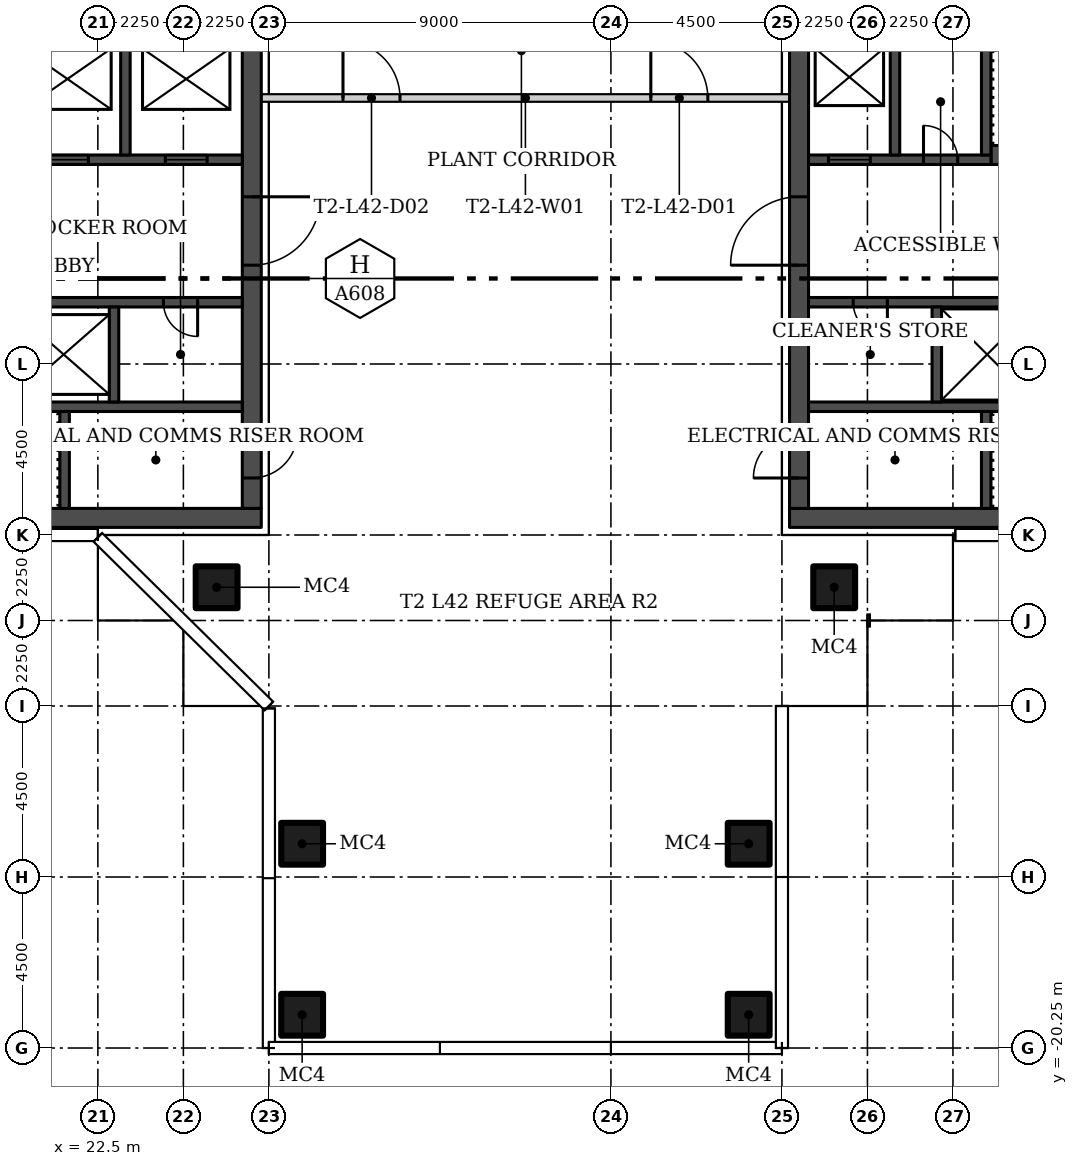
"""IFC4 building model, lengths in metres.
Left out: names, types, materials, properties, quantities, classifications, styles, units other than length and angle.
Written with IfcOpenShell. Run it as: python <this file> out.ifc"""

import sys

from ifc_helpers import new_model, si_unit, direction, frame, frame_2d, origin, origin_2d, place, context, subcontext, project, spatial, rectangle, hollow_rectangle, extrude, element, fill, save


model = new_model("IFC4")
c1 = context("Model", 3, precision=1e-05, world=origin(), true_north=direction((0.0, 1.0)))
c2 = subcontext(c1, "Body", "Model", "MODEL_VIEW")
j1 = project(units=[si_unit("LENGTHUNIT", "METRE"), si_unit("PLANEANGLEUNIT", "RADIAN")], contexts=[c1])
p1 = place(None, origin())
s1 = spatial("IfcSite", under=j1, at=p1, CompositionType="ELEMENT")
p2 = place(p1, origin())
s2 = spatial("IfcBuilding", under=s1, at=p2, CompositionType="ELEMENT")
p3 = place(p2, frame((0.0, 0.0, 177.9)))
s3 = spatial("IfcBuildingStorey", under=s2, at=p3, CompositionType="ELEMENT", Elevation=177.9)
for number, where in (
    (1, (25.625, -8.125, 0.0)),
    (2, (41.875, -8.125, 0.0)),
    (3, (39.625, -14.875, 0.0)),
    (4, (39.625, -19.375, 0.0)),
    (5, (27.875, -14.875, 0.0)),
    (6, (27.875, -19.375, 0.0)),
):
    element("IfcColumn", number, at=place(p3, frame(where)), inside=s3, PredefinedType="COLUMN", context=c2, shape_type="SweptSolid", body=[
        extrude(hollow_rectangle(XDim=1.1, YDim=1.1, WallThickness=0.04, at=origin_2d()), origin(), (0.0, 0.0, 1.0), 4.45),
    ])
p4 = place(p3, frame((26.8, 4.75, 0.0)))
e7 = element("IfcWall", 7, at=p4, inside=s3, PredefinedType="PARTITIONING", context=c2, shape_type="SweptSolid", body=[
    extrude(rectangle(XDim=13.9, YDim=0.2, at=frame_2d((6.95, 0.0))), origin(), (0.0, 0.0, 1.0), 4.45),
])
p5 = place(p4, frame((10.25, 0.0, 0.0)))
e8 = element("IfcOpeningElement", 8, at=p5, cuts=e7, PredefinedType="OPENING", context=c2, shape_type="SweptSolid", body=[
    extrude(rectangle(XDim=1.5, YDim=2.4, at=frame_2d((0.75, 1.2))), frame((0.0, 0.11, 0.0), z_axis=(0.0, -1.0, 0.0), x_axis=(1.0, 0.0, 0.0)), (0.0, 0.0, 1.0), 0.22),
])
p6 = place(p4, frame((2.15, 0.0, 0.0)))
e9 = element("IfcOpeningElement", 9, at=p6, cuts=e7, PredefinedType="OPENING", context=c2, shape_type="SweptSolid", body=[
    extrude(rectangle(XDim=1.5, YDim=2.4, at=frame_2d((0.75, 1.2))), frame((0.0, 0.11, 0.0), z_axis=(0.0, -1.0, 0.0), x_axis=(1.0, 0.0, 0.0)), (0.0, 0.0, 1.0), 0.22),
])
p7 = place(p3, frame((13.7, -6.3, 0.0)))
e10 = element("IfcWall", 10, at=p7, inside=s3, PredefinedType="SHEAR", context=c2, shape_type="SweptSolid", body=[
    extrude(rectangle(XDim=13.1, YDim=0.5, at=frame_2d((6.55, 0.0))), origin(), (0.0, 0.0, 1.0), 4.45),
])
p8 = place(p3, frame((26.55, 6.05, 0.0), z_axis=(0.0, 0.0, 1.0), x_axis=(0.0, -1.0, 0.0)))
e11 = element("IfcWall", 11, at=p8, inside=s3, PredefinedType="SHEAR", context=c2, shape_type="SweptSolid", body=[
    extrude(rectangle(XDim=12.1, YDim=0.5, at=frame_2d((6.05, 0.0))), origin(), (0.0, 0.0, 1.0), 4.45),
])
p9 = place(p8, frame((10.1, 0.0, 0.0)))
e12 = element("IfcOpeningElement", 12, at=p9, cuts=e11, PredefinedType="OPENING", context=c2, shape_type="SweptSolid", body=[
    extrude(rectangle(XDim=1.2, YDim=2.1, at=frame_2d((0.6, 1.05))), frame((0.0, 0.26, 0.0), z_axis=(0.0, -1.0, 0.0), x_axis=(1.0, 0.0, 0.0)), (0.0, 0.0, 1.0), 0.52),
])
p10 = place(p8, frame((3.9, 0.0, 0.0)))
e13 = element("IfcOpeningElement", 13, at=p10, cuts=e11, PredefinedType="OPENING", context=c2, shape_type="SweptSolid", body=[
    extrude(rectangle(XDim=1.8, YDim=2.4, at=frame_2d((0.9, 1.2))), frame((0.0, 0.26, 0.0), z_axis=(0.0, -1.0, 0.0), x_axis=(1.0, 0.0, 0.0)), (0.0, 0.0, 1.0), 0.52),
])
p11 = place(p3, frame((26.3, -3.375, 0.0), z_axis=(0.0, 0.0, 1.0), x_axis=(-1.0, 0.0, 0.0)))
e14 = element("IfcWall", 14, at=p11, inside=s3, PredefinedType="SHEAR", context=c2, shape_type="SweptSolid", body=[
    extrude(rectangle(XDim=12.1, YDim=0.25, at=frame_2d((6.05, 0.0))), origin(), (0.0, 0.0, 1.0), 4.45),
])
p12 = place(p11, frame((10.95, 0.0, 0.0)))
e15 = element("IfcOpeningElement", 15, at=p12, cuts=e14, PredefinedType="OPENING", context=c2, shape_type="SweptSolid", body=[
    extrude(rectangle(XDim=1.1, YDim=2.1, at=frame_2d((0.55, 1.05))), frame((0.0, 0.135, 0.0), z_axis=(0.0, -1.0, 0.0), x_axis=(1.0, 0.0, 0.0)), (0.0, 0.0, 1.0), 0.27),
])
p13 = place(p3, frame((21.625, -6.05, 0.0), z_axis=(0.0, 0.0, 1.0), x_axis=(0.0, 1.0, 0.0)))
e16 = element("IfcWall", 16, at=p13, inside=s3, PredefinedType="SHEAR", context=c2, shape_type="SweptSolid", body=[
    extrude(rectangle(XDim=2.55, YDim=0.25, at=frame_2d((1.275, 0.0))), origin(), (0.0, 0.0, 1.0), 4.45),
])
p14 = place(p3, frame((26.3, -0.625, 0.0), z_axis=(0.0, 0.0, 1.0), x_axis=(-1.0, 0.0, 0.0)))
e17 = element("IfcWall", 17, at=p14, inside=s3, PredefinedType="SHEAR", context=c2, shape_type="SweptSolid", body=[
    extrude(rectangle(XDim=12.1, YDim=0.25, at=frame_2d((6.05, 0.0))), origin(), (0.0, 0.0, 1.0), 4.45),
])
p15 = place(p14, frame((8.65, 0.0, 0.0)))
e18 = element("IfcOpeningElement", 18, at=p15, cuts=e17, PredefinedType="OPENING", context=c2, shape_type="SweptSolid", body=[
    extrude(rectangle(XDim=1.2, YDim=2.1, at=frame_2d((0.6, 1.05))), frame((0.0, 0.135, 0.0), z_axis=(0.0, -1.0, 0.0), x_axis=(1.0, 0.0, 0.0)), (0.0, 0.0, 1.0), 0.27),
])
p16 = place(p14, frame((1.175, 0.0, 0.0)))
e19 = element("IfcOpeningElement", 19, at=p16, cuts=e17, PredefinedType="OPENING", context=c2, shape_type="SweptSolid", body=[
    extrude(rectangle(XDim=0.9, YDim=2.1, at=frame_2d((0.45, 1.05))), frame((0.0, 0.135, 0.0), z_axis=(0.0, -1.0, 0.0), x_axis=(1.0, 0.0, 0.0)), (0.0, 0.0, 1.0), 0.27),
])
p17 = place(p3, frame((22.925, -3.25, 0.0), z_axis=(0.0, 0.0, 1.0), x_axis=(0.0, 1.0, 0.0)))
e20 = element("IfcWall", 20, at=p17, inside=s3, PredefinedType="SHEAR", context=c2, shape_type="SweptSolid", body=[
    extrude(rectangle(XDim=2.5, YDim=0.25, at=frame_2d((1.25, 0.0))), origin(), (0.0, 0.0, 1.0), 4.45),
])
p18 = place(p3, frame((14.2, 3.125, 0.0)))
e21 = element("IfcWall", 21, at=p18, inside=s3, PredefinedType="SHEAR", context=c2, shape_type="SweptSolid", body=[
    extrude(rectangle(XDim=12.1, YDim=0.25, at=frame_2d((6.05, 0.0))), origin(), (0.0, 0.0, 1.0), 4.45),
])
p19 = place(p18, frame((6.95, 0.0, 0.0)))
e22 = element("IfcOpeningElement", 22, at=p19, cuts=e21, PredefinedType="OPENING", context=c2, shape_type="SweptSolid", body=[
    extrude(rectangle(XDim=1.1, YDim=2.1, at=frame_2d((0.55, 1.05))), frame((0.0, 0.135, 0.0), z_axis=(0.0, -1.0, 0.0), x_axis=(1.0, 0.0, 0.0)), (0.0, 0.0, 1.0), 0.27),
])
p20 = place(p18, frame((10.075, 0.0, 0.0)))
e23 = element("IfcOpeningElement", 23, at=p20, cuts=e21, PredefinedType="OPENING", context=c2, shape_type="SweptSolid", body=[
    extrude(rectangle(XDim=1.1, YDim=2.1, at=frame_2d((0.55, 1.05))), frame((0.0, 0.135, 0.0), z_axis=(0.0, -1.0, 0.0), x_axis=(1.0, 0.0, 0.0)), (0.0, 0.0, 1.0), 0.27),
])
p21 = place(p18, frame((2.475, 0.0, 0.0)))
e24 = element("IfcOpeningElement", 24, at=p21, cuts=e21, PredefinedType="OPENING", context=c2, shape_type="SweptSolid", body=[
    extrude(rectangle(XDim=0.9, YDim=2.1, at=frame_2d((0.45, 1.05))), frame((0.0, 0.135, 0.0), z_axis=(0.0, -1.0, 0.0), x_axis=(1.0, 0.0, 0.0)), (0.0, 0.0, 1.0), 0.27),
])
p22 = place(p3, frame((23.225, 3.25, 0.0), z_axis=(0.0, 0.0, 1.0), x_axis=(0.0, 1.0, 0.0)))
e25 = element("IfcWall", 25, at=p22, inside=s3, PredefinedType="SHEAR", context=c2, shape_type="SweptSolid", body=[
    extrude(rectangle(XDim=2.8, YDim=0.25, at=frame_2d((1.4, 0.0))), origin(), (0.0, 0.0, 1.0), 4.45),
])
p23 = place(p3, frame((53.8, -6.3, 0.0), z_axis=(0.0, 0.0, 1.0), x_axis=(-1.0, 0.0, 0.0)))
e26 = element("IfcWall", 26, at=p23, inside=s3, PredefinedType="SHEAR", context=c2, shape_type="SweptSolid", body=[
    extrude(rectangle(XDim=13.1, YDim=0.5, at=frame_2d((6.55, 0.0))), origin(), (0.0, 0.0, 1.0), 4.45),
])
p24 = place(p3, frame((40.95, -6.05, 0.0), z_axis=(0.0, 0.0, 1.0), x_axis=(0.0, 1.0, 0.0)))
e27 = element("IfcWall", 27, at=p24, inside=s3, PredefinedType="SHEAR", context=c2, shape_type="SweptSolid", body=[
    extrude(rectangle(XDim=12.1, YDim=0.5, at=frame_2d((6.05, 0.0))), origin(), (0.0, 0.0, 1.0), 4.45),
])
p25 = place(p24, frame((0.8, 0.0, 0.0)))
e28 = element("IfcOpeningElement", 28, at=p25, cuts=e27, PredefinedType="OPENING", context=c2, shape_type="SweptSolid", body=[
    extrude(rectangle(XDim=1.2, YDim=2.1, at=frame_2d((0.6, 1.05))), frame((0.0, 0.26, 0.0), z_axis=(0.0, -1.0, 0.0), x_axis=(1.0, 0.0, 0.0)), (0.0, 0.0, 1.0), 0.52),
])
p26 = place(p24, frame((6.4, 0.0, 0.0)))
e29 = element("IfcOpeningElement", 29, at=p26, cuts=e27, PredefinedType="OPENING", context=c2, shape_type="SweptSolid", body=[
    extrude(rectangle(XDim=1.8, YDim=2.4, at=frame_2d((0.9, 1.2))), frame((0.0, 0.26, 0.0), z_axis=(0.0, -1.0, 0.0), x_axis=(1.0, 0.0, 0.0)), (0.0, 0.0, 1.0), 0.52),
])
p27 = place(p3, frame((53.3, -3.375, 0.0), z_axis=(0.0, 0.0, 1.0), x_axis=(-1.0, 0.0, 0.0)))
e30 = element("IfcWall", 30, at=p27, inside=s3, PredefinedType="SHEAR", context=c2, shape_type="SweptSolid", body=[
    extrude(rectangle(XDim=12.1, YDim=0.25, at=frame_2d((6.05, 0.0))), origin(), (0.0, 0.0, 1.0), 4.45),
])
p28 = place(p27, frame((0.05, 0.0, 0.0)))
e31 = element("IfcOpeningElement", 31, at=p28, cuts=e30, PredefinedType="OPENING", context=c2, shape_type="SweptSolid", body=[
    extrude(rectangle(XDim=1.1, YDim=2.1, at=frame_2d((0.55, 1.05))), frame((0.0, 0.135, 0.0), z_axis=(0.0, -1.0, 0.0), x_axis=(1.0, 0.0, 0.0)), (0.0, 0.0, 1.0), 0.27),
])
p29 = place(p3, frame((45.875, -6.05, 0.0), z_axis=(0.0, 0.0, 1.0), x_axis=(0.0, 1.0, 0.0)))
e32 = element("IfcWall", 32, at=p29, inside=s3, PredefinedType="SHEAR", context=c2, shape_type="SweptSolid", body=[
    extrude(rectangle(XDim=2.55, YDim=0.25, at=frame_2d((1.275, 0.0))), origin(), (0.0, 0.0, 1.0), 4.45),
])
p30 = place(p3, frame((53.3, -0.625, 0.0), z_axis=(0.0, 0.0, 1.0), x_axis=(-1.0, 0.0, 0.0)))
e33 = element("IfcWall", 33, at=p30, inside=s3, PredefinedType="SHEAR", context=c2, shape_type="SweptSolid", body=[
    extrude(rectangle(XDim=12.1, YDim=0.25, at=frame_2d((6.05, 0.0))), origin(), (0.0, 0.0, 1.0), 4.45),
])
p31 = place(p30, frame((2.25, 0.0, 0.0)))
e34 = element("IfcOpeningElement", 34, at=p31, cuts=e33, PredefinedType="OPENING", context=c2, shape_type="SweptSolid", body=[
    extrude(rectangle(XDim=1.2, YDim=2.1, at=frame_2d((0.6, 1.05))), frame((0.0, 0.135, 0.0), z_axis=(0.0, -1.0, 0.0), x_axis=(1.0, 0.0, 0.0)), (0.0, 0.0, 1.0), 0.27),
])
p32 = place(p30, frame((10.025, 0.0, 0.0)))
e35 = element("IfcOpeningElement", 35, at=p32, cuts=e33, PredefinedType="OPENING", context=c2, shape_type="SweptSolid", body=[
    extrude(rectangle(XDim=0.9, YDim=2.1, at=frame_2d((0.45, 1.05))), frame((0.0, 0.135, 0.0), z_axis=(0.0, -1.0, 0.0), x_axis=(1.0, 0.0, 0.0)), (0.0, 0.0, 1.0), 0.27),
])
p33 = place(p3, frame((44.575, -3.25, 0.0), z_axis=(0.0, 0.0, 1.0), x_axis=(0.0, 1.0, 0.0)))
e36 = element("IfcWall", 36, at=p33, inside=s3, PredefinedType="SHEAR", context=c2, shape_type="SweptSolid", body=[
    extrude(rectangle(XDim=2.5, YDim=0.25, at=frame_2d((1.25, 0.0))), origin(), (0.0, 0.0, 1.0), 4.45),
])
p34 = place(p3, frame((46.0, 3.25, 0.0)))
e37 = element("IfcWall", 37, at=p34, inside=s3, PredefinedType="SHEAR", context=c2, shape_type="SweptSolid", body=[
    extrude(rectangle(XDim=7.3, YDim=0.5, at=frame_2d((3.65, 0.0))), origin(), (0.0, 0.0, 1.0), 4.45),
])
p35 = place(p34, frame((6.15, 0.0, 0.0)))
e38 = element("IfcOpeningElement", 38, at=p35, cuts=e37, PredefinedType="OPENING", context=c2, shape_type="SweptSolid", body=[
    extrude(rectangle(XDim=1.1, YDim=2.1, at=frame_2d((0.55, 1.05))), frame((0.0, 0.26, 0.0), z_axis=(0.0, -1.0, 0.0), x_axis=(1.0, 0.0, 0.0)), (0.0, 0.0, 1.0), 0.52),
])
p36 = place(p3, frame((41.2, 3.125, 0.0)))
e39 = element("IfcWall", 39, at=p36, inside=s3, PredefinedType="SHEAR", context=c2, shape_type="SweptSolid", body=[
    extrude(rectangle(XDim=4.8, YDim=0.25, at=frame_2d((2.4, 0.0))), origin(), (0.0, 0.0, 1.0), 4.45),
])
p37 = place(p36, frame((0.525, 0.0, 0.0)))
e40 = element("IfcOpeningElement", 40, at=p37, cuts=e39, PredefinedType="OPENING", context=c2, shape_type="SweptSolid", body=[
    extrude(rectangle(XDim=1.1, YDim=2.1, at=frame_2d((0.55, 1.05))), frame((0.0, 0.135, 0.0), z_axis=(0.0, -1.0, 0.0), x_axis=(1.0, 0.0, 0.0)), (0.0, 0.0, 1.0), 0.27),
])
p38 = place(p36, frame((3.025, 0.0, 0.0)))
e41 = element("IfcOpeningElement", 41, at=p38, cuts=e39, PredefinedType="OPENING", context=c2, shape_type="SweptSolid", body=[
    extrude(rectangle(XDim=0.9, YDim=2.1, at=frame_2d((0.45, 1.05))), frame((0.0, 0.135, 0.0), z_axis=(0.0, -1.0, 0.0), x_axis=(1.0, 0.0, 0.0)), (0.0, 0.0, 1.0), 0.27),
])
for number, where, z_axis, x_axis in (
    (42, (45.875, 3.25, 0.0), (0.0, 0.0, 1.0), (0.0, 1.0, 0.0)),
    (43, (43.475, 3.25, 0.0), (0.0, 0.0, 1.0), (0.0, 1.0, 0.0)),
):
    element("IfcWall", number, at=place(p3, frame(where, z_axis=z_axis, x_axis=x_axis)), inside=s3, PredefinedType="SHEAR", context=c2, shape_type="SweptSolid", body=[
        extrude(rectangle(XDim=2.8, YDim=0.25, at=frame_2d((1.4, 0.0))), origin(), (0.0, 0.0, 1.0), 4.45),
    ])
p39 = place(p5, origin())
e44 = element("IfcDoor", 44, at=p39, inside=s3, OperationType="DOUBLE_DOOR_SINGLE_SWING", PredefinedType="DOOR", context=c2, shape_type="SweptSolid", body=[
    extrude(rectangle(XDim=1.5, YDim=2.4, at=frame_2d((0.75, 1.2))), frame((0.0, 0.025, 0.0), z_axis=(0.0, -1.0, 0.0), x_axis=(1.0, 0.0, 0.0)), (0.0, 0.0, 1.0), 0.05),
])
fill(e8, e44)
p40 = place(p6, origin())
e45 = element("IfcDoor", 45, at=p40, inside=s3, OperationType="DOUBLE_DOOR_SINGLE_SWING", PredefinedType="DOOR", context=c2, shape_type="SweptSolid", body=[
    extrude(rectangle(XDim=1.5, YDim=2.4, at=frame_2d((0.75, 1.2))), frame((0.0, 0.025, 0.0), z_axis=(0.0, -1.0, 0.0), x_axis=(1.0, 0.0, 0.0)), (0.0, 0.0, 1.0), 0.05),
])
fill(e9, e45)
p41 = place(p9, origin())
e46 = element("IfcDoor", 46, at=p41, inside=s3, OperationType="SINGLE_SWING_RIGHT", PredefinedType="DOOR", context=c2, shape_type="SweptSolid", body=[
    extrude(rectangle(XDim=1.2, YDim=2.1, at=frame_2d((0.6, 1.05))), frame((0.0, 0.025, 0.0), z_axis=(0.0, -1.0, 0.0), x_axis=(1.0, 0.0, 0.0)), (0.0, 0.0, 1.0), 0.05),
])
fill(e12, e46)
p42 = place(p10, origin())
e47 = element("IfcDoor", 47, at=p42, inside=s3, OperationType="DOUBLE_DOOR_SINGLE_SWING", PredefinedType="DOOR", context=c2, shape_type="SweptSolid", body=[
    extrude(rectangle(XDim=1.8, YDim=2.4, at=frame_2d((0.9, 1.2))), frame((0.0, 0.025, 0.0), z_axis=(0.0, -1.0, 0.0), x_axis=(1.0, 0.0, 0.0)), (0.0, 0.0, 1.0), 0.05),
])
fill(e13, e47)
p43 = place(p16, origin())
e48 = element("IfcDoor", 48, at=p43, inside=s3, OperationType="SINGLE_SWING_LEFT", PredefinedType="DOOR", context=c2, shape_type="SweptSolid", body=[
    extrude(rectangle(XDim=0.9, YDim=2.1, at=frame_2d((0.45, 1.05))), frame((0.0, 0.025, 0.0), z_axis=(0.0, -1.0, 0.0), x_axis=(1.0, 0.0, 0.0)), (0.0, 0.0, 1.0), 0.05),
])
fill(e19, e48)
p44 = place(p19, origin())
e49 = element("IfcDoor", 49, at=p44, inside=s3, OperationType="SLIDING_TO_LEFT", PredefinedType="DOOR", context=c2, shape_type="SweptSolid", body=[
    extrude(rectangle(XDim=1.1, YDim=2.1, at=frame_2d((0.55, 1.05))), frame((0.0, 0.025, 0.0), z_axis=(0.0, -1.0, 0.0), x_axis=(1.0, 0.0, 0.0)), (0.0, 0.0, 1.0), 0.05),
])
fill(e22, e49)
p45 = place(p20, origin())
e50 = element("IfcDoor", 50, at=p45, inside=s3, OperationType="SLIDING_TO_LEFT", PredefinedType="DOOR", context=c2, shape_type="SweptSolid", body=[
    extrude(rectangle(XDim=1.1, YDim=2.1, at=frame_2d((0.55, 1.05))), frame((0.0, 0.025, 0.0), z_axis=(0.0, -1.0, 0.0), x_axis=(1.0, 0.0, 0.0)), (0.0, 0.0, 1.0), 0.05),
])
fill(e23, e50)
p46 = place(p25, origin())
e51 = element("IfcDoor", 51, at=p46, inside=s3, OperationType="SINGLE_SWING_LEFT", PredefinedType="DOOR", context=c2, shape_type="SweptSolid", body=[
    extrude(rectangle(XDim=1.2, YDim=2.1, at=frame_2d((0.6, 1.05))), frame((0.0, 0.025, 0.0), z_axis=(0.0, -1.0, 0.0), x_axis=(1.0, 0.0, 0.0)), (0.0, 0.0, 1.0), 0.05),
])
fill(e28, e51)
p47 = place(p26, origin())
e52 = element("IfcDoor", 52, at=p47, inside=s3, OperationType="DOUBLE_DOOR_SINGLE_SWING", PredefinedType="DOOR", context=c2, shape_type="SweptSolid", body=[
    extrude(rectangle(XDim=1.8, YDim=2.4, at=frame_2d((0.9, 1.2))), frame((0.0, 0.025, 0.0), z_axis=(0.0, -1.0, 0.0), x_axis=(1.0, 0.0, 0.0)), (0.0, 0.0, 1.0), 0.05),
])
fill(e29, e52)
p48 = place(p32, origin())
e53 = element("IfcDoor", 53, at=p48, inside=s3, OperationType="SINGLE_SWING_RIGHT", PredefinedType="DOOR", context=c2, shape_type="SweptSolid", body=[
    extrude(rectangle(XDim=0.9, YDim=2.1, at=frame_2d((0.45, 1.05))), frame((0.0, 0.025, 0.0), z_axis=(0.0, -1.0, 0.0), x_axis=(1.0, 0.0, 0.0)), (0.0, 0.0, 1.0), 0.05),
])
fill(e35, e53)
p49 = place(p37, origin())
e54 = element("IfcDoor", 54, at=p49, inside=s3, OperationType="SLIDING_TO_LEFT", PredefinedType="DOOR", context=c2, shape_type="SweptSolid", body=[
    extrude(rectangle(XDim=1.1, YDim=2.1, at=frame_2d((0.55, 1.05))), frame((0.0, 0.025, 0.0), z_axis=(0.0, -1.0, 0.0), x_axis=(1.0, 0.0, 0.0)), (0.0, 0.0, 1.0), 0.05),
])
fill(e40, e54)
p50 = place(p38, origin())
e55 = element("IfcDoor", 55, at=p50, inside=s3, OperationType="SINGLE_SWING_RIGHT", PredefinedType="DOOR", context=c2, shape_type="SweptSolid", body=[
    extrude(rectangle(XDim=0.9, YDim=2.1, at=frame_2d((0.45, 1.05))), frame((0.0, 0.025, 0.0), z_axis=(0.0, -1.0, 0.0), x_axis=(1.0, 0.0, 0.0)), (0.0, 0.0, 1.0), 0.05),
])
fill(e41, e55)
save(model, sys.argv[1])
